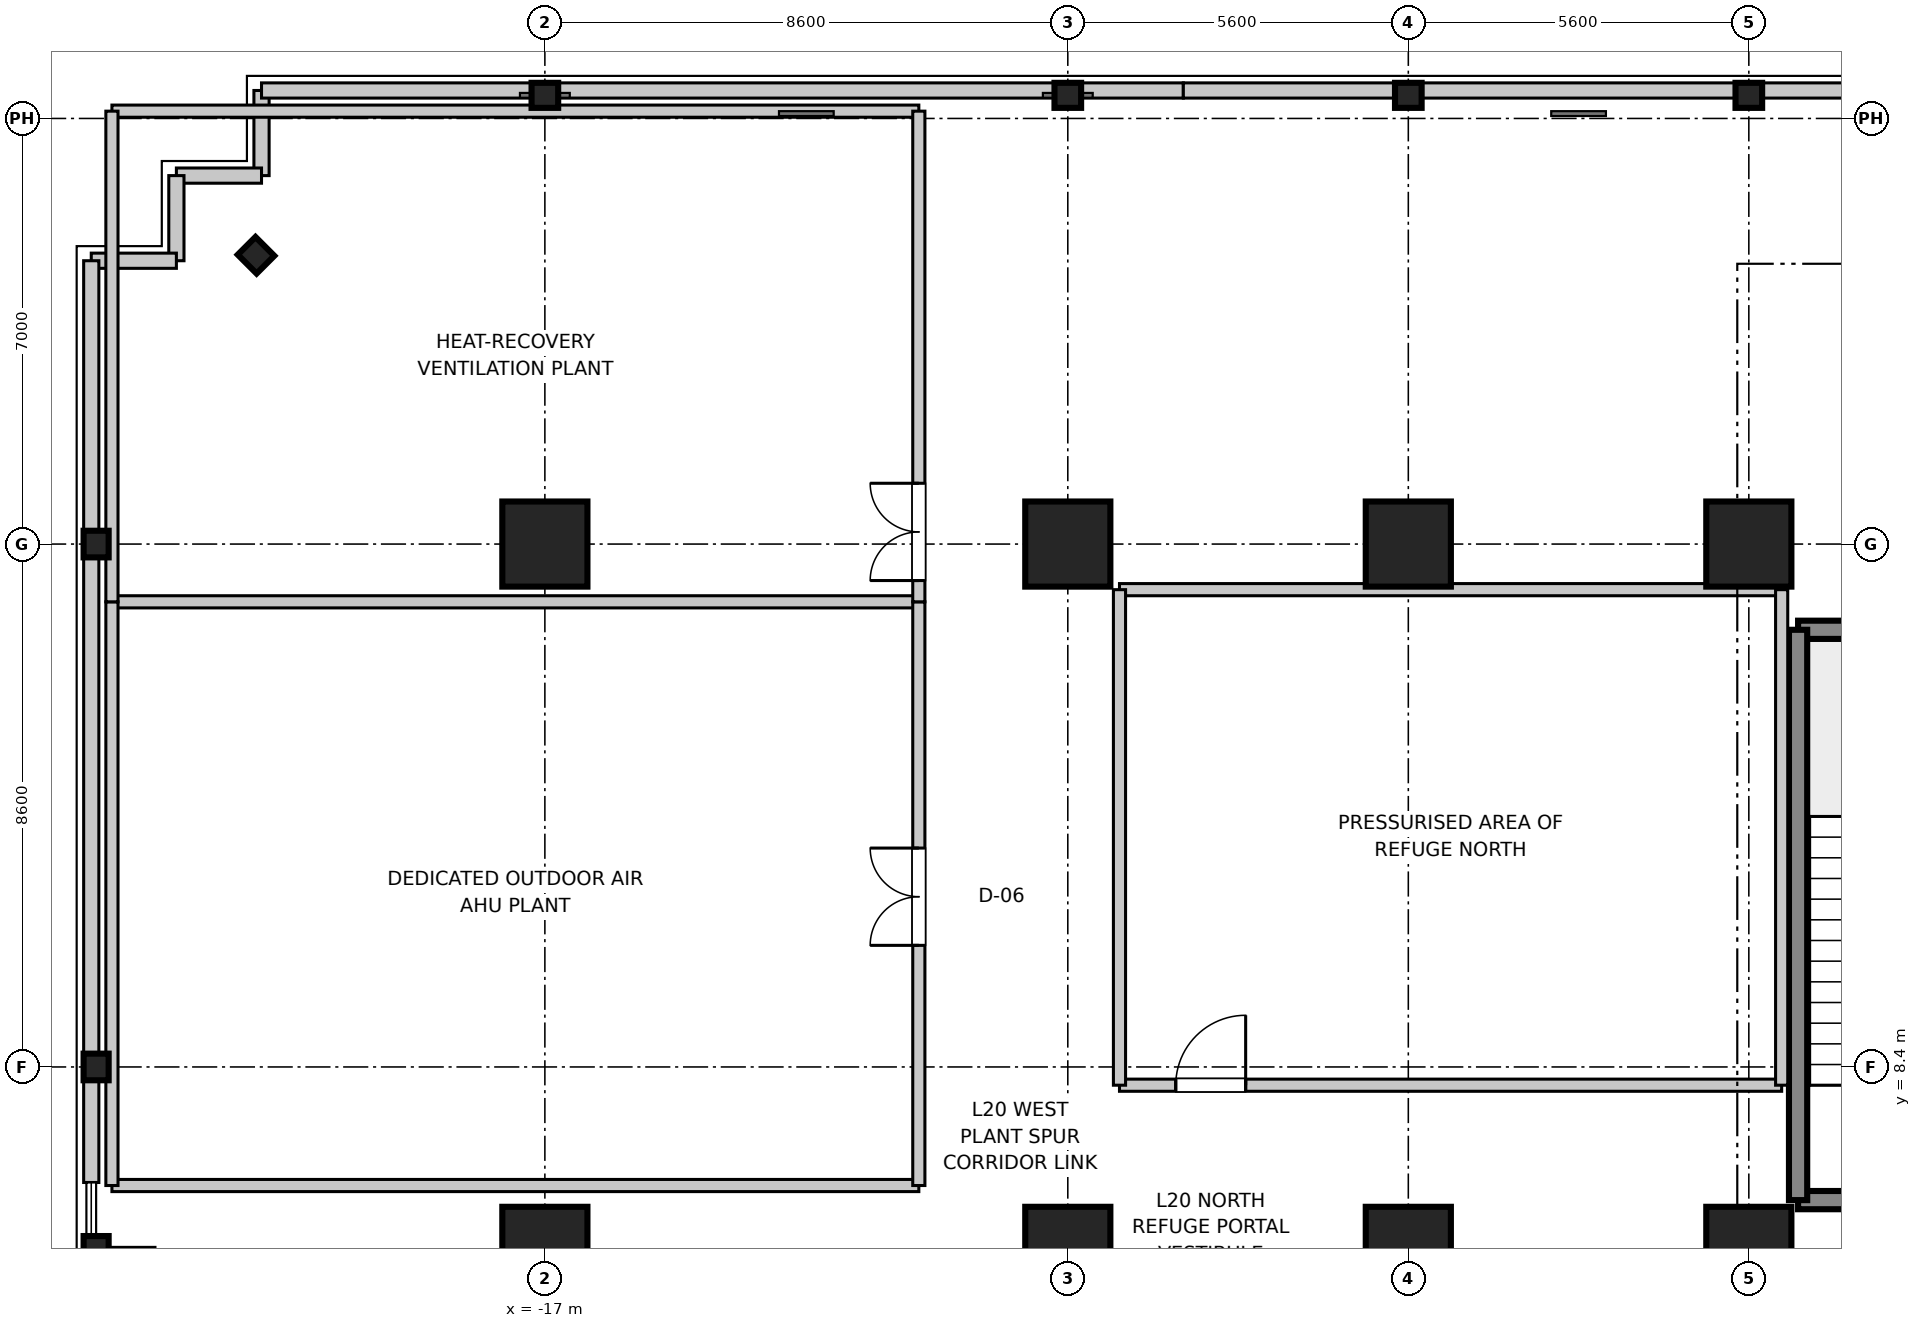
"""IFC4 building model, lengths in metres.
Left out: names, types, materials, properties, quantities, classifications, styles, units other than length and angle.
Written with IfcOpenShell. Run it as: python <this file> out.ifc"""

import sys

from ifc_helpers import new_model, si_unit, direction, frame, frame_2d, origin, origin_2d, place, context, subcontext, project, spatial, rectangle, i_section, extrude, source, transform, mapped, element, fill, save


model = new_model("IFC4")
c1 = context("Model", 3, precision=1e-05, world=origin(), true_north=direction((0.0, 1.0)))
c2 = subcontext(c1, "Body", "Model", "MODEL_VIEW")
j1 = project(units=[si_unit("LENGTHUNIT", "METRE"), si_unit("PLANEANGLEUNIT", "RADIAN")], contexts=[c1])
p1 = place(None, origin())
s1 = spatial("IfcSite", under=j1, at=p1, CompositionType="ELEMENT")
p2 = place(p1, origin())
s2 = spatial("IfcBuilding", under=s1, at=p2, CompositionType="ELEMENT")
p3 = place(p2, frame((0.0, 0.0, 83.5)))
s3 = spatial("IfcBuildingStorey", under=s2, at=p3, CompositionType="ELEMENT", Elevation=83.5)
m1 = source(origin(), c2, "Body", "SweptSolid", [
    extrude(rectangle(XDim=1.4, YDim=1.4, at=origin_2d()), origin(), (0.0, 0.0, 1.0), 4.755),
])
for number, where, z_axis, x_axis in (
    (1, (-17.0, 5.4, 0.0), (0.0, 0.0, 1.0), (1.0, 0.0, 0.0)),
    (2, (-17.0, 17.0, 0.0), (0.0, 0.0, 1.0), (1.0, 0.0, 0.0)),
    (3, (-8.4, 5.4, 0.0), (0.0, 0.0, 1.0), (1.0, 0.0, 0.0)),
    (4, (-8.4, 17.0, 0.0), (0.0, 0.0, 1.0), (1.0, 0.0, 0.0)),
    (5, (-2.8, 5.4, 0.0), (0.0, 0.0, 1.0), (1.0, 0.0, 0.0)),
    (6, (-2.8, 17.0, 0.0), (0.0, 0.0, 1.0), (1.0, 0.0, 0.0)),
    (7, (2.8, 5.4, 0.0), (0.0, 0.0, 1.0), (1.0, 0.0, 0.0)),
    (8, (2.8, 17.0, 0.0), (0.0, 0.0, 1.0), (1.0, 0.0, 0.0)),
):
    element("IfcColumn", number, at=place(p3, frame(where, z_axis=z_axis, x_axis=x_axis)), inside=s3, PredefinedType="COLUMN", context=c2, shape_type="MappedRepresentation", body=[
        mapped(m1, transform((0.0, 0.0, 0.0), scale=1.0)),
    ])
m2 = source(origin(), c2, "Body", "SweptSolid", [
    extrude(i_section(OverallWidth=0.412, OverallDepth=0.438, WebThickness=0.023, FlangeThickness=0.036, at=origin_2d()), origin(), (0.0, 0.0, 1.0), 4.694),
])
for number, where, z_axis, x_axis in (
    (9, (-24.38, 5.4, 0.0), (0.128, 0.0, 0.992), (0.0, 1.0, 0.0)),
    (10, (-24.38, 8.4, 0.0), (0.128, 0.0, 0.992), (0.0, 1.0, 0.0)),
    (11, (-24.38, 17.0, 0.0), (0.128, 0.0, 0.992), (0.0, 1.0, 0.0)),
    (12, (-17.0, 24.38, 0.0), (0.0, -0.128, 0.992), (0.0, 0.992, 0.128)),
    (13, (-8.4, 24.38, 0.0), (0.0, -0.128, 0.992), (0.0, 0.992, 0.128)),
    (14, (-2.8, 24.38, 0.0), (0.0, -0.128, 0.992), (0.0, 0.992, 0.128)),
    (15, (2.8, 24.38, 0.0), (0.0, -0.128, 0.992), (0.0, 0.992, 0.128)),
):
    element("IfcColumn", number, at=place(p3, frame(where, z_axis=z_axis, x_axis=x_axis)), inside=s3, PredefinedType="COLUMN", context=c2, shape_type="MappedRepresentation", body=[
        mapped(m2, transform((0.0, 0.0, 0.0), scale=1.0)),
    ])
m3 = source(origin(), c2, "Body", "SweptSolid", [
    extrude(i_section(OverallWidth=0.412, OverallDepth=0.438, WebThickness=0.023, FlangeThickness=0.036, at=origin_2d()), origin(), (0.0, 0.0, 1.0), 4.732),
])
p4 = place(p3, frame((-21.75, 21.75, 0.0), z_axis=(0.126823408548, -0.126823408548, 0.983784349382), x_axis=(0.008107825309, 0.991892174691, 0.126823408548)))
e16 = element("IfcColumn", 16, at=p4, inside=s3, PredefinedType="COLUMN", context=c2, shape_type="MappedRepresentation", body=[
    mapped(m3, transform((0.0, 0.0, 0.0), scale=1.0)),
])
m4 = source(origin(), c2, "Body", "SweptSolid", [
    extrude(rectangle(XDim=3.98, YDim=0.3, at=frame_2d((1.99, 0.0))), origin(), (0.0, 0.0, 1.0), 4.53),
])
for number, where, z_axis, x_axis in (
    (17, (3.61, 6.21, 0.0), (0.0, 0.0, 1.0), (1.0, 0.0, 0.0)),
    (18, (3.61, 15.59, 0.0), (0.0, 0.0, 1.0), (1.0, 0.0, 0.0)),
):
    element("IfcWall", number, at=place(p3, frame(where, z_axis=z_axis, x_axis=x_axis)), inside=s3, PredefinedType="SHEAR", context=c2, shape_type="MappedRepresentation", body=[
        mapped(m4, transform((0.0, 0.0, 0.0), scale=1.0)),
    ])
m5 = source(origin(), c2, "Body", "SweptSolid", [
    extrude(rectangle(XDim=9.38, YDim=0.3, at=frame_2d((4.69, 0.0))), origin(), (0.0, 0.0, 1.0), 4.53),
])
p5 = place(p3, frame((3.61, 6.21, 0.0), z_axis=(0.0, 0.0, 1.0), x_axis=(0.0, 1.0, 0.0)))
e19 = element("IfcWall", 19, at=p5, inside=s3, PredefinedType="SHEAR", context=c2, shape_type="MappedRepresentation", body=[
    mapped(m5, transform((0.0, 0.0, 0.0), scale=1.0)),
])
m6 = source(origin(), c2, "Body", "SweptSolid", [
    extrude(rectangle(XDim=1.4, YDim=0.25, at=frame_2d((0.7, 0.0))), origin(), (0.0, 0.0, 1.0), 4.53),
])
p6 = place(p3, frame((-21.66, 23.06, 0.0), z_axis=(0.0, 0.0, 1.0), x_axis=(0.0, 1.0, 0.0)))
e20 = element("IfcWall", 20, at=p6, inside=s3, PredefinedType="STANDARD", context=c2, shape_type="MappedRepresentation", body=[
    mapped(m6, transform((0.0, 0.0, 0.0), scale=1.0)),
])
m7 = source(origin(), c2, "Body", "SweptSolid", [
    extrude(rectangle(XDim=1.4, YDim=0.25, at=frame_2d((0.7, 0.0))), origin(), (0.0, 0.0, 1.0), 4.53),
])
for number, where, z_axis, x_axis in (
    (21, (-23.06, 23.06, 0.0), (0.0, 0.0, 1.0), (1.0, 0.0, 0.0)),
    (22, (-23.06, 21.66, 0.0), (0.0, 0.0, 1.0), (0.0, 1.0, 0.0)),
):
    element("IfcWall", number, at=place(p3, frame(where, z_axis=z_axis, x_axis=x_axis)), inside=s3, PredefinedType="STANDARD", context=c2, shape_type="MappedRepresentation", body=[
        mapped(m7, transform((0.0, 0.0, 0.0), scale=1.0)),
    ])
p7 = place(p3, frame((-24.46, 21.66, 0.0), z_axis=(0.0, 0.0, 1.0), x_axis=(1.0, 0.0, 0.0)))
e23 = element("IfcWall", 23, at=p7, inside=s3, PredefinedType="STANDARD", context=c2, shape_type="MappedRepresentation", body=[
    mapped(m6, transform((0.0, 0.0, 0.0), scale=1.0)),
])
m8 = source(origin(), c2, "Body", "SweptSolid", [
    extrude(rectangle(XDim=15.16, YDim=0.25, at=frame_2d((7.58, 0.0))), origin(), (0.0, 0.0, 1.0), 4.01),
])
p8 = place(p3, frame((-21.66, 24.46, 0.0), z_axis=(0.0, 0.0, 1.0), x_axis=(1.0, 0.0, 0.0)))
e24 = element("IfcWall", 24, at=p8, inside=s3, PredefinedType="STANDARD", context=c2, shape_type="MappedRepresentation", body=[
    mapped(m8, transform((0.0, 0.0, 0.0), scale=1.0)),
])
m9 = source(origin(), c2, "Body", "SweptSolid", [
    extrude(rectangle(XDim=13.0, YDim=0.25, at=frame_2d((6.5, 0.0))), origin(), (0.0, 0.0, 1.0), 4.01),
])
p9 = place(p3, frame((-6.5, 24.46, 0.0), z_axis=(0.0, 0.0, 1.0), x_axis=(1.0, 0.0, 0.0)))
e25 = element("IfcWall", 25, at=p9, inside=s3, PredefinedType="STANDARD", context=c2, shape_type="MappedRepresentation", body=[
    mapped(m9, transform((0.0, 0.0, 0.0), scale=1.0)),
])
p10 = place(p3, frame((-24.46, 6.5, 0.0), z_axis=(0.0, 0.0, 1.0), x_axis=(0.0, 1.0, 0.0)))
e26 = element("IfcWall", 26, at=p10, inside=s3, PredefinedType="STANDARD", context=c2, shape_type="MappedRepresentation", body=[
    mapped(m8, transform((0.0, 0.0, 0.0), scale=1.0)),
])
m10 = source(origin(), c2, "Body", "SweptSolid", [
    extrude(rectangle(XDim=10.89, YDim=0.2, at=frame_2d((5.445, 0.0))), origin(), (0.0, 0.0, 1.0), 3.4),
])
p11 = place(p3, frame((-7.55, 8.1, 0.0), z_axis=(0.0, 0.0, 1.0), x_axis=(1.0, 0.0, 0.0)))
e27 = element("IfcWall", 27, at=p11, inside=s3, PredefinedType="PARTITIONING", context=c2, shape_type="MappedRepresentation", body=[
    mapped(m10, transform((0.0, 0.0, 0.0), scale=1.0)),
])
p12 = place(p11, frame((0.925, 0.0, 0.0)))
e28 = element("IfcOpeningElement", 28, at=p12, cuts=e27, PredefinedType="OPENING", context=c2, shape_type="SweptSolid", body=[
    extrude(rectangle(XDim=1.15, YDim=2.15, at=frame_2d((0.575, 1.075))), frame((0.0, 0.11, 0.0), z_axis=(0.0, -1.0, 0.0), x_axis=(1.0, 0.0, 0.0)), (0.0, 0.0, 1.0), 0.22),
])
p13 = place(p3, frame((-7.55, 16.25, 0.0), z_axis=(0.0, 0.0, 1.0), x_axis=(1.0, 0.0, 0.0)))
e29 = element("IfcWall", 29, at=p13, inside=s3, PredefinedType="PARTITIONING", context=c2, shape_type="MappedRepresentation", body=[
    mapped(m10, transform((0.0, 0.0, 0.0), scale=1.0)),
])
m11 = source(origin(), c2, "Body", "SweptSolid", [
    extrude(rectangle(XDim=8.15, YDim=0.2, at=frame_2d((4.075, 0.0))), origin(), (0.0, 0.0, 1.0), 3.4),
])
for number, where, z_axis, x_axis in (
    (30, (-7.55, 8.1, 0.0), (0.0, 0.0, 1.0), (0.0, 1.0, 0.0)),
    (31, (3.34, 8.1, 0.0), (0.0, 0.0, 1.0), (0.0, 1.0, 0.0)),
):
    element("IfcWall", number, at=place(p3, frame(where, z_axis=z_axis, x_axis=x_axis)), inside=s3, PredefinedType="PARTITIONING", context=c2, shape_type="MappedRepresentation", body=[
        mapped(m11, transform((0.0, 0.0, 0.0), scale=1.0)),
    ])
m12 = source(origin(), c2, "Body", "SweptSolid", [
    extrude(rectangle(XDim=13.27, YDim=0.2, at=frame_2d((6.635, 0.0))), origin(), (0.0, 0.0, 1.0), 3.4),
])
for number, where, z_axis, x_axis in (
    (32, (-24.12, 6.45, 0.0), (0.0, 0.0, 1.0), (1.0, 0.0, 0.0)),
    (33, (-24.12, 16.05, 0.0), (0.0, 0.0, 1.0), (1.0, 0.0, 0.0)),
):
    element("IfcWall", number, at=place(p3, frame(where, z_axis=z_axis, x_axis=x_axis)), inside=s3, PredefinedType="PARTITIONING", context=c2, shape_type="MappedRepresentation", body=[
        mapped(m12, transform((0.0, 0.0, 0.0), scale=1.0)),
    ])
m13 = source(origin(), c2, "Body", "SweptSolid", [
    extrude(rectangle(XDim=9.6, YDim=0.2, at=frame_2d((4.8, 0.0))), origin(), (0.0, 0.0, 1.0), 3.4),
])
p14 = place(p3, frame((-24.12, 6.45, 0.0), z_axis=(0.0, 0.0, 1.0), x_axis=(0.0, 1.0, 0.0)))
e34 = element("IfcWall", 34, at=p14, inside=s3, PredefinedType="PARTITIONING", context=c2, shape_type="MappedRepresentation", body=[
    mapped(m13, transform((0.0, 0.0, 0.0), scale=1.0)),
])
p15 = place(p3, frame((-10.85, 6.45, 0.0), z_axis=(0.0, 0.0, 1.0), x_axis=(0.0, 1.0, 0.0)))
e35 = element("IfcWall", 35, at=p15, inside=s3, PredefinedType="PARTITIONING", context=c2, shape_type="MappedRepresentation", body=[
    mapped(m13, transform((0.0, 0.0, 0.0), scale=1.0)),
])
p16 = place(p15, frame((3.95, 0.0, 0.0)))
e36 = element("IfcOpeningElement", 36, at=p16, cuts=e35, PredefinedType="OPENING", context=c2, shape_type="SweptSolid", body=[
    extrude(rectangle(XDim=1.6, YDim=2.15, at=frame_2d((0.8, 1.075))), frame((0.0, 0.11, 0.0), z_axis=(0.0, -1.0, 0.0), x_axis=(1.0, 0.0, 0.0)), (0.0, 0.0, 1.0), 0.22),
])
p17 = place(p3, frame((-24.12, 24.12, 0.0), z_axis=(0.0, 0.0, 1.0), x_axis=(1.0, 0.0, 0.0)))
e37 = element("IfcWall", 37, at=p17, inside=s3, PredefinedType="PARTITIONING", context=c2, shape_type="MappedRepresentation", body=[
    mapped(m12, transform((0.0, 0.0, 0.0), scale=1.0)),
])
m14 = source(origin(), c2, "Body", "SweptSolid", [
    extrude(rectangle(XDim=8.07, YDim=0.2, at=frame_2d((4.035, 0.0))), origin(), (0.0, 0.0, 1.0), 3.4),
])
p18 = place(p3, frame((-24.12, 16.05, 0.0), z_axis=(0.0, 0.0, 1.0), x_axis=(0.0, 1.0, 0.0)))
e38 = element("IfcWall", 38, at=p18, inside=s3, PredefinedType="PARTITIONING", context=c2, shape_type="MappedRepresentation", body=[
    mapped(m14, transform((0.0, 0.0, 0.0), scale=1.0)),
])
p19 = place(p3, frame((-10.85, 16.05, 0.0), z_axis=(0.0, 0.0, 1.0), x_axis=(0.0, 1.0, 0.0)))
e39 = element("IfcWall", 39, at=p19, inside=s3, PredefinedType="PARTITIONING", context=c2, shape_type="MappedRepresentation", body=[
    mapped(m14, transform((0.0, 0.0, 0.0), scale=1.0)),
])
p20 = place(p19, frame((0.35, 0.0, 0.0)))
e40 = element("IfcOpeningElement", 40, at=p20, cuts=e39, PredefinedType="OPENING", context=c2, shape_type="SweptSolid", body=[
    extrude(rectangle(XDim=1.6, YDim=2.15, at=frame_2d((0.8, 1.075))), frame((0.0, 0.11, 0.0), z_axis=(0.0, -1.0, 0.0), x_axis=(1.0, 0.0, 0.0)), (0.0, 0.0, 1.0), 0.22),
])
m15 = source(origin(), c2, "Body", "SweptSolid", [
    extrude(rectangle(XDim=1.15, YDim=2.15, at=frame_2d((0.575, 1.075))), frame((0.0, 0.025, 0.0), z_axis=(0.0, -1.0, 0.0), x_axis=(1.0, 0.0, 0.0)), (0.0, 0.0, 1.0), 0.05),
])
p21 = place(p12, origin())
e41 = element("IfcDoor", 41, at=p21, inside=s3, OperationType="SINGLE_SWING_RIGHT", PredefinedType="DOOR", context=c2, shape_type="MappedRepresentation", body=[
    mapped(m15, transform((0.0, 0.0, 0.0), scale=1.0)),
])
fill(e28, e41)
m16 = source(origin(), c2, "Body", "SweptSolid", [
    extrude(rectangle(XDim=1.6, YDim=2.15, at=frame_2d((0.8, 1.075))), frame((0.0, 0.025, 0.0), z_axis=(0.0, -1.0, 0.0), x_axis=(1.0, 0.0, 0.0)), (0.0, 0.0, 1.0), 0.05),
])
p22 = place(p16, origin())
e42 = element("IfcDoor", 42, at=p22, inside=s3, OperationType="DOUBLE_DOOR_SINGLE_SWING", PredefinedType="DOOR", context=c2, shape_type="MappedRepresentation", body=[
    mapped(m16, transform((0.0, 0.0, 0.0), scale=1.0)),
])
fill(e36, e42)
p23 = place(p20, origin())
e43 = element("IfcDoor", 43, at=p23, inside=s3, OperationType="DOUBLE_DOOR_SINGLE_SWING", PredefinedType="DOOR", context=c2, shape_type="MappedRepresentation", body=[
    mapped(m16, transform((0.0, 0.0, 0.0), scale=1.0)),
])
fill(e40, e43)
save(model, sys.argv[1])
